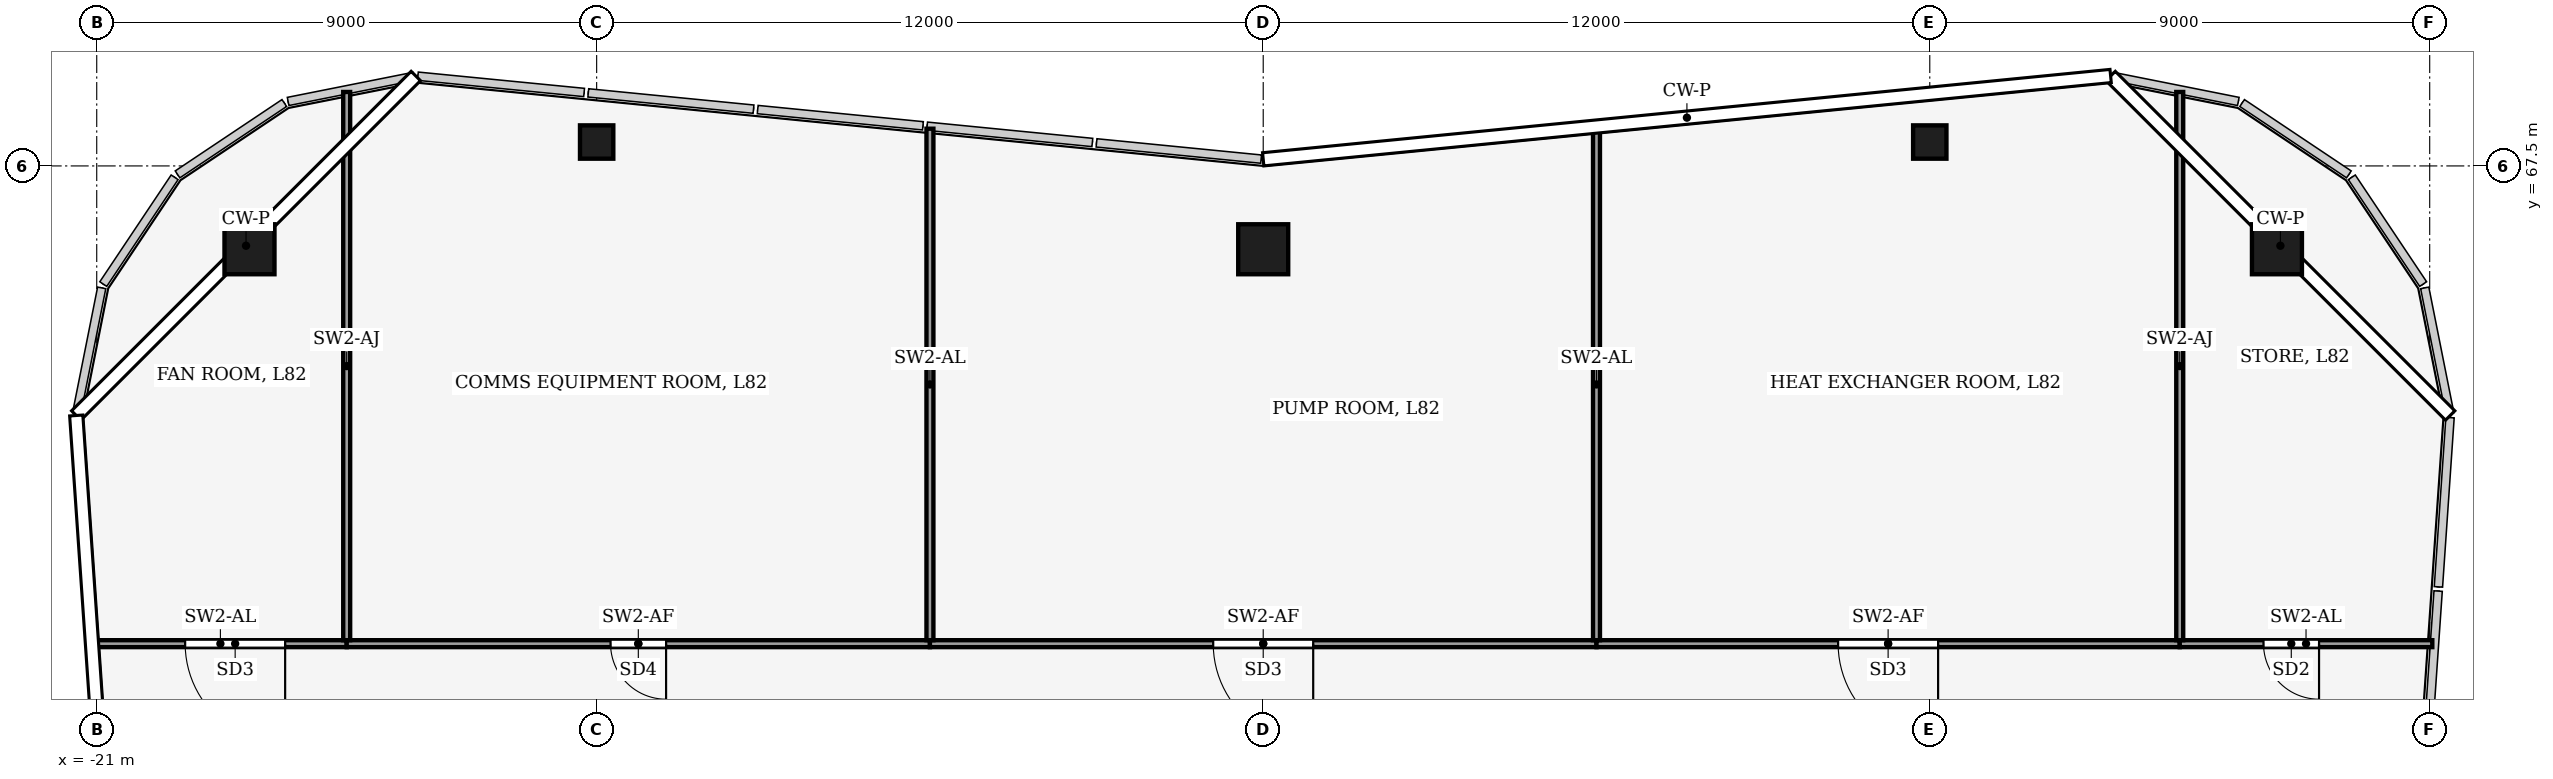
"""IFC4 building model, lengths in metres.
Left out: names, types, materials, properties, quantities, classifications, styles, units other than length and angle.
Written with IfcOpenShell. Run it as: python <this file> out.ifc"""

import sys

from ifc_helpers import new_model, si_unit, direction, frame, frame_2d, origin, origin_2d, place, context, subcontext, project, spatial, rectangle, hollow_rectangle, extrude, element, fill, save


model = new_model("IFC4")
c1 = context("Model", 3, precision=1e-05, world=origin(), true_north=direction((0.0, 1.0)))
c2 = subcontext(c1, "Body", "Model", "MODEL_VIEW")
j1 = project(units=[si_unit("LENGTHUNIT", "METRE"), si_unit("PLANEANGLEUNIT", "RADIAN")], contexts=[c1])
p1 = place(None, origin())
s1 = spatial("IfcSite", under=j1, at=p1, CompositionType="ELEMENT")
p2 = place(p1, origin())
s2 = spatial("IfcBuilding", under=s1, at=p2, CompositionType="ELEMENT")
p3 = place(p2, frame((0.0, 0.0, 364.0)))
s3 = spatial("IfcBuildingStorey", under=s2, at=p3, CompositionType="ELEMENT", Elevation=364.0)
for number, where, z_axis, x_axis in (
    (1, (-18.25, 66.0, 0.0), (0.0, 0.0, 1.0), (1.0, 0.0, 0.0)),
    (2, (0.0, 66.0, 0.0), (0.0, 0.0, 1.0), (1.0, 0.0, 0.0)),
    (3, (18.25, 66.0, 0.0), (0.0, 0.0, 1.0), (1.0, 0.0, 0.0)),
):
    element("IfcColumn", number, at=place(p3, frame(where, z_axis=z_axis, x_axis=x_axis)), inside=s3, PredefinedType="COLUMN", context=c2, shape_type="SweptSolid", body=[
        extrude(hollow_rectangle(XDim=0.9, YDim=0.9, WallThickness=0.04, at=origin_2d()), origin(), (0.0, 0.0, 1.0), 4.0),
    ])
for number, where, z_axis, x_axis in (
    (4, (-12.0, 67.93, 0.0), (0.0, 0.0, 1.0), (1.0, 0.0, 0.0)),
    (5, (12.0, 67.93, 0.0), (0.0, 0.0, 1.0), (1.0, 0.0, 0.0)),
):
    element("IfcColumn", number, at=place(p3, frame(where, z_axis=z_axis, x_axis=x_axis)), inside=s3, PredefinedType="COLUMN", context=c2, shape_type="SweptSolid", body=[
        extrude(hollow_rectangle(XDim=0.6, YDim=0.6, WallThickness=0.025, at=origin_2d()), origin(), (0.0, 0.0, 1.0), 4.0),
    ])
p4 = place(p3, frame((-16.5, 58.9, 0.0), z_axis=(0.0, 0.0, 1.0), x_axis=(-1.0, 0.0, 0.0)))
e6 = element("IfcWall", 6, at=p4, inside=s3, PredefinedType="PARTITIONING", context=c2, shape_type="SweptSolid", body=[
    extrude(rectangle(XDim=4.547, YDim=0.125, at=frame_2d((2.273, 0.0))), origin(), (0.0, 0.0, 1.0), 3.02),
])
p5 = place(p4, frame((1.108, 0.0, 0.0)))
e7 = element("IfcOpeningElement", 7, at=p5, cuts=e6, PredefinedType="OPENING", context=c2, shape_type="SweptSolid", body=[
    extrude(rectangle(XDim=1.8, YDim=2.4, at=frame_2d((0.9, 1.2))), frame((0.0, 0.073, 0.0), z_axis=(0.0, -1.0, 0.0), x_axis=(1.0, 0.0, 0.0)), (0.0, 0.0, 1.0), 0.145),
])
p6 = place(p3, frame((-6.0, 58.9, 0.0), z_axis=(0.0, 0.0, 1.0), x_axis=(-1.0, 0.0, 0.0)))
e8 = element("IfcWall", 8, at=p6, inside=s3, PredefinedType="PARTITIONING", context=c2, shape_type="SweptSolid", body=[
    extrude(rectangle(XDim=10.5, YDim=0.125, at=frame_2d((5.25, 0.0))), origin(), (0.0, 0.0, 1.0), 3.22),
])
p7 = place(p6, frame((4.75, 0.0, 0.0)))
e9 = element("IfcOpeningElement", 9, at=p7, cuts=e8, PredefinedType="OPENING", context=c2, shape_type="SweptSolid", body=[
    extrude(rectangle(XDim=1.0, YDim=2.1, at=frame_2d((0.5, 1.05))), frame((0.0, 0.073, 0.0), z_axis=(0.0, -1.0, 0.0), x_axis=(1.0, 0.0, 0.0)), (0.0, 0.0, 1.0), 0.145),
])
p8 = place(p3, frame((6.0, 58.9, 0.0), z_axis=(0.0, 0.0, 1.0), x_axis=(-1.0, 0.0, 0.0)))
e10 = element("IfcWall", 10, at=p8, inside=s3, PredefinedType="PARTITIONING", context=c2, shape_type="SweptSolid", body=[
    extrude(rectangle(XDim=12.0, YDim=0.125, at=frame_2d((6.0, 0.0))), origin(), (0.0, 0.0, 1.0), 3.22),
])
p9 = place(p8, frame((5.1, 0.0, 0.0)))
e11 = element("IfcOpeningElement", 11, at=p9, cuts=e10, PredefinedType="OPENING", context=c2, shape_type="SweptSolid", body=[
    extrude(rectangle(XDim=1.8, YDim=2.4, at=frame_2d((0.9, 1.2))), frame((0.0, 0.073, 0.0), z_axis=(0.0, -1.0, 0.0), x_axis=(1.0, 0.0, 0.0)), (0.0, 0.0, 1.0), 0.145),
])
p10 = place(p3, frame((16.5, 58.9, 0.0), z_axis=(0.0, 0.0, 1.0), x_axis=(-1.0, 0.0, 0.0)))
e12 = element("IfcWall", 12, at=p10, inside=s3, PredefinedType="PARTITIONING", context=c2, shape_type="SweptSolid", body=[
    extrude(rectangle(XDim=10.5, YDim=0.125, at=frame_2d((5.25, 0.0))), origin(), (0.0, 0.0, 1.0), 3.22),
])
p11 = place(p10, frame((4.35, 0.0, 0.0)))
e13 = element("IfcOpeningElement", 13, at=p11, cuts=e12, PredefinedType="OPENING", context=c2, shape_type="SweptSolid", body=[
    extrude(rectangle(XDim=1.8, YDim=2.4, at=frame_2d((0.9, 1.2))), frame((0.0, 0.073, 0.0), z_axis=(0.0, -1.0, 0.0), x_axis=(1.0, 0.0, 0.0)), (0.0, 0.0, 1.0), 0.145),
])
p12 = place(p3, frame((21.047, 58.9, 0.0), z_axis=(0.0, 0.0, 1.0), x_axis=(-1.0, 0.0, 0.0)))
e14 = element("IfcWall", 14, at=p12, inside=s3, PredefinedType="PARTITIONING", context=c2, shape_type="SweptSolid", body=[
    extrude(rectangle(XDim=4.547, YDim=0.125, at=frame_2d((2.273, 0.0))), origin(), (0.0, 0.0, 1.0), 3.02),
])
p13 = place(p12, frame((2.039, 0.0, 0.0)))
e15 = element("IfcOpeningElement", 15, at=p13, cuts=e14, PredefinedType="OPENING", context=c2, shape_type="SweptSolid", body=[
    extrude(rectangle(XDim=1.0, YDim=2.1, at=frame_2d((0.5, 1.05))), frame((0.0, 0.073, 0.0), z_axis=(0.0, -1.0, 0.0), x_axis=(1.0, 0.0, 0.0)), (0.0, 0.0, 1.0), 0.145),
])
p14 = place(p3, frame((-16.5, 68.831, 0.0), z_axis=(0.0, 0.0, 1.0), x_axis=(0.0, -1.0, 0.0)))
e16 = element("IfcWall", 16, at=p14, inside=s3, PredefinedType="PARTITIONING", context=c2, shape_type="SweptSolid", body=[
    extrude(rectangle(XDim=9.869, YDim=0.125, at=frame_2d((4.935, 0.0))), origin(), (0.0, 0.0, 1.0), 2.812),
])
for number, where, z_axis, x_axis in (
    (17, (-6.0, 68.17, 0.0), (0.0, 0.0, 1.0), (0.0, -1.0, 0.0)),
    (18, (6.0, 68.17, 0.0), (0.0, 0.0, 1.0), (0.0, -1.0, 0.0)),
):
    element("IfcWall", number, at=place(p3, frame(where, z_axis=z_axis, x_axis=x_axis)), inside=s3, PredefinedType="PARTITIONING", context=c2, shape_type="SweptSolid", body=[
        extrude(rectangle(XDim=9.208, YDim=0.125, at=frame_2d((4.604, 0.0))), origin(), (0.0, 0.0, 1.0), 3.02),
    ])
p15 = place(p3, frame((16.5, 68.831, 0.0), z_axis=(0.0, 0.0, 1.0), x_axis=(0.0, -1.0, 0.0)))
e19 = element("IfcWall", 19, at=p15, inside=s3, PredefinedType="PARTITIONING", context=c2, shape_type="SweptSolid", body=[
    extrude(rectangle(XDim=9.869, YDim=0.125, at=frame_2d((4.935, 0.0))), origin(), (0.0, 0.0, 1.0), 2.812),
])
p16 = place(p5, origin())
e20 = element("IfcDoor", 20, at=p16, inside=s3, OperationType="DOUBLE_DOOR_SINGLE_SWING", PredefinedType="DOOR", context=c2, shape_type="SweptSolid", body=[
    extrude(rectangle(XDim=1.8, YDim=2.4, at=frame_2d((0.9, 1.2))), frame((0.0, 0.025, 0.0), z_axis=(0.0, -1.0, 0.0), x_axis=(1.0, 0.0, 0.0)), (0.0, 0.0, 1.0), 0.05),
])
fill(e7, e20)
p17 = place(p7, origin())
e21 = element("IfcDoor", 21, at=p17, inside=s3, OperationType="SINGLE_SWING_LEFT", PredefinedType="DOOR", context=c2, shape_type="SweptSolid", body=[
    extrude(rectangle(XDim=1.0, YDim=2.1, at=frame_2d((0.5, 1.05))), frame((0.0, 0.025, 0.0), z_axis=(0.0, -1.0, 0.0), x_axis=(1.0, 0.0, 0.0)), (0.0, 0.0, 1.0), 0.05),
])
fill(e9, e21)
p18 = place(p9, origin())
e22 = element("IfcDoor", 22, at=p18, inside=s3, OperationType="DOUBLE_DOOR_SINGLE_SWING", PredefinedType="DOOR", context=c2, shape_type="SweptSolid", body=[
    extrude(rectangle(XDim=1.8, YDim=2.4, at=frame_2d((0.9, 1.2))), frame((0.0, 0.025, 0.0), z_axis=(0.0, -1.0, 0.0), x_axis=(1.0, 0.0, 0.0)), (0.0, 0.0, 1.0), 0.05),
])
fill(e11, e22)
p19 = place(p11, origin())
e23 = element("IfcDoor", 23, at=p19, inside=s3, OperationType="DOUBLE_DOOR_SINGLE_SWING", PredefinedType="DOOR", context=c2, shape_type="SweptSolid", body=[
    extrude(rectangle(XDim=1.8, YDim=2.4, at=frame_2d((0.9, 1.2))), frame((0.0, 0.025, 0.0), z_axis=(0.0, -1.0, 0.0), x_axis=(1.0, 0.0, 0.0)), (0.0, 0.0, 1.0), 0.05),
])
fill(e13, e23)
p20 = place(p13, origin())
e24 = element("IfcDoor", 24, at=p20, inside=s3, OperationType="SINGLE_SWING_RIGHT", PredefinedType="DOOR", context=c2, shape_type="SweptSolid", body=[
    extrude(rectangle(XDim=1.0, YDim=2.1, at=frame_2d((0.5, 1.05))), frame((0.0, 0.025, 0.0), z_axis=(0.0, -1.0, 0.0), x_axis=(1.0, 0.0, 0.0)), (0.0, 0.0, 1.0), 0.05),
])
fill(e15, e24)
save(model, sys.argv[1])
